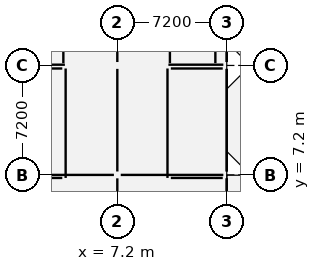
"""IFC4 building model, lengths in metres.
Left out: names, types, materials, properties, quantities, classifications, styles, units other than length and angle.
Written with IfcOpenShell. Run it as: python <this file> out.ifc"""

import sys

from ifc_helpers import new_model, si_unit, direction, frame, frame_2d, origin, origin_2d, place, context, subcontext, project, spatial, rectangle, extrude, element, fill, save


model = new_model("IFC4")
c1 = context("Model", 3, precision=1e-05, world=origin(), true_north=direction((0.0, 1.0)))
c2 = subcontext(c1, "Body", "Model", "MODEL_VIEW")
j1 = project(units=[si_unit("LENGTHUNIT", "METRE"), si_unit("PLANEANGLEUNIT", "RADIAN")], contexts=[c1])
p1 = place(None, origin())
s1 = spatial("IfcSite", under=j1, at=p1, CompositionType="ELEMENT")
p2 = place(p1, origin())
s2 = spatial("IfcBuilding", under=s1, at=p2, CompositionType="ELEMENT")
p3 = place(p2, frame((0.0, 0.0, 9.6)))
s3 = spatial("IfcBuildingStorey", under=s2, at=p3, CompositionType="ELEMENT", Elevation=9.6)
for number, where, z_axis, x_axis in (
    (1, (7.2, 7.2, 0.0), (0.0, 0.0, 1.0), (1.0, 0.0, 0.0)),
    (2, (7.2, 14.4, 0.0), (0.0, 0.0, 1.0), (1.0, 0.0, 0.0)),
    (3, (14.4, 7.2, 0.0), (0.0, 0.0, 1.0), (1.0, 0.0, 0.0)),
    (4, (14.4, 14.4, 0.0), (0.0, 0.0, 1.0), (1.0, 0.0, 0.0)),
):
    element("IfcColumn", number, at=place(p3, frame(where, z_axis=z_axis, x_axis=x_axis)), inside=s3, PredefinedType="COLUMN", context=c2, shape_type="SweptSolid", body=[
        extrude(rectangle(XDim=0.45, YDim=0.45, at=origin_2d()), origin(), (0.0, 0.0, 1.0), 3.9),
    ])
p4 = place(p3, frame((0.225, 14.45, 0.0), z_axis=(0.0, 0.0, 1.0), x_axis=(1.0, 0.0, 0.0)))
e5 = element("IfcWall", 5, at=p4, inside=s3, PredefinedType="SHEAR", context=c2, shape_type="SweptSolid", body=[
    extrude(rectangle(XDim=3.525, YDim=0.2, at=frame_2d((1.762, 0.0))), origin(), (0.0, 0.0, 1.0), 3.65),
])
p5 = place(p3, frame((3.65, 14.55, 0.0), z_axis=(0.0, 0.0, 1.0), x_axis=(0.0, 1.0, 0.0)))
e6 = element("IfcWall", 6, at=p5, inside=s3, PredefinedType="SHEAR", context=c2, shape_type="SweptSolid", body=[
    extrude(rectangle(XDim=6.56, YDim=0.2, at=frame_2d((3.28, 0.0))), origin(), (0.0, 0.0, 1.0), 3.65),
])
p6 = place(p5, frame((0.14, 0.0, 0.0)))
e7 = element("IfcOpeningElement", 7, at=p6, cuts=e6, PredefinedType="OPENING", context=c2, shape_type="SweptSolid", body=[
    extrude(rectangle(XDim=1.1, YDim=2.15, at=frame_2d((0.55, 1.075))), frame((0.0, 0.112, 0.0), z_axis=(0.0, -1.0, 0.0), x_axis=(1.0, 0.0, 0.0)), (0.0, 0.0, 1.0), 0.224),
])
p7 = place(p3, frame((10.56, 14.45, 0.0), z_axis=(0.0, 0.0, 1.0), x_axis=(1.0, 0.0, 0.0)))
e8 = element("IfcWall", 8, at=p7, inside=s3, PredefinedType="SHEAR", context=c2, shape_type="SweptSolid", body=[
    extrude(rectangle(XDim=3.615, YDim=0.2, at=frame_2d((1.808, 0.0))), origin(), (0.0, 0.0, 1.0), 3.65),
])
p8 = place(p3, frame((10.66, 14.55, 0.0), z_axis=(0.0, 0.0, 1.0), x_axis=(0.0, 1.0, 0.0)))
e9 = element("IfcWall", 9, at=p8, inside=s3, PredefinedType="SHEAR", context=c2, shape_type="SweptSolid", body=[
    extrude(rectangle(XDim=6.56, YDim=0.2, at=frame_2d((3.28, 0.0))), origin(), (0.0, 0.0, 1.0), 3.65),
])
p9 = place(p8, frame((0.14, 0.0, 0.0)))
e10 = element("IfcOpeningElement", 10, at=p9, cuts=e9, PredefinedType="OPENING", context=c2, shape_type="SweptSolid", body=[
    extrude(rectangle(XDim=1.1, YDim=2.15, at=frame_2d((0.55, 1.075))), frame((0.0, 0.112, 0.0), z_axis=(0.0, -1.0, 0.0), x_axis=(1.0, 0.0, 0.0)), (0.0, 0.0, 1.0), 0.224),
])
p10 = place(p3, frame((13.65, 14.55, 0.0), z_axis=(0.0, 0.0, 1.0), x_axis=(0.0, 1.0, 0.0)))
e11 = element("IfcWall", 11, at=p10, inside=s3, PredefinedType="SHEAR", context=c2, shape_type="SweptSolid", body=[
    extrude(rectangle(XDim=6.56, YDim=0.2, at=frame_2d((3.28, 0.0))), origin(), (0.0, 0.0, 1.0), 3.65),
])
p11 = place(p3, frame((14.4, 0.225, 0.0), z_axis=(0.0, 0.0, 1.0), x_axis=(0.0, 1.0, 0.0)))
e12 = element("IfcWall", 12, at=p11, inside=s3, PredefinedType="ELEMENTEDWALL", context=c2, shape_type="SweptSolid", body=[
    extrude(rectangle(XDim=6.75, YDim=0.28, at=frame_2d((3.375, 0.0))), origin(), (0.0, 0.0, 1.0), 2.99),
])
p12 = place(p11, frame((4.515, 0.0, 0.0)))
e13 = element("IfcOpeningElement", 13, at=p12, cuts=e12, PredefinedType="OPENING", context=c2, shape_type="SweptSolid", body=[
    extrude(rectangle(XDim=1.5, YDim=2.2, at=frame_2d((0.75, 1.1))), frame((0.0, 0.152, 0.0), z_axis=(0.0, -1.0, 0.0), x_axis=(1.0, 0.0, 0.0)), (0.0, 0.0, 1.0), 0.304),
])
p13 = place(p3, frame((14.4, 7.425, 0.0), z_axis=(0.0, 0.0, 1.0), x_axis=(0.0, 1.0, 0.0)))
e14 = element("IfcWall", 14, at=p13, inside=s3, PredefinedType="ELEMENTEDWALL", context=c2, shape_type="SweptSolid", body=[
    extrude(rectangle(XDim=6.75, YDim=0.28, at=frame_2d((3.375, 0.0))), origin(), (0.0, 0.0, 1.0), 3.04),
])
p14 = place(p13, frame((2.7, 0.0, 0.85)))
e15 = element("IfcOpeningElement", 15, at=p14, cuts=e14, PredefinedType="OPENING", context=c2, shape_type="SweptSolid", body=[
    extrude(rectangle(XDim=1.35, YDim=2.0, at=frame_2d((0.675, 1.0))), frame((0.0, 0.152, 0.0), z_axis=(0.0, -1.0, 0.0), x_axis=(1.0, 0.0, 0.0)), (0.0, 0.0, 1.0), 0.304),
])
p15 = place(p3, frame((14.4, 14.625, 0.0), z_axis=(0.0, 0.0, 1.0), x_axis=(0.0, 1.0, 0.0)))
e16 = element("IfcWall", 16, at=p15, inside=s3, PredefinedType="ELEMENTEDWALL", context=c2, shape_type="SweptSolid", body=[
    extrude(rectangle(XDim=6.75, YDim=0.28, at=frame_2d((3.375, 0.0))), origin(), (0.0, 0.0, 1.0), 2.99),
])
p16 = place(p15, frame((2.475, 0.0, 0.85)))
e17 = element("IfcOpeningElement", 17, at=p16, cuts=e16, PredefinedType="OPENING", context=c2, shape_type="SweptSolid", body=[
    extrude(rectangle(XDim=1.8, YDim=1.95, at=frame_2d((0.9, 0.975))), frame((0.0, 0.152, 0.0), z_axis=(0.0, -1.0, 0.0), x_axis=(1.0, 0.0, 0.0)), (0.0, 0.0, 1.0), 0.304),
])
p17 = place(p3, frame((10.5, 7.0, 0.0), z_axis=(0.0, 0.0, 1.0), x_axis=(0.0, 1.0, 0.0)))
e18 = element("IfcWall", 18, at=p17, inside=s3, PredefinedType="STANDARD", context=c2, shape_type="SweptSolid", body=[
    extrude(rectangle(XDim=7.2, YDim=0.15, at=frame_2d((3.6, 0.0))), origin(), (0.0, 0.0, 1.0), 2.938),
])
p18 = place(p17, frame((3.075, 0.0, 0.0)))
e19 = element("IfcOpeningElement", 19, at=p18, cuts=e18, PredefinedType="OPENING", context=c2, shape_type="SweptSolid", body=[
    extrude(rectangle(XDim=1.05, YDim=2.15, at=frame_2d((0.525, 1.075))), frame((0.0, 0.087, 0.0), z_axis=(0.0, -1.0, 0.0), x_axis=(1.0, 0.0, 0.0)), (0.0, 0.0, 1.0), 0.174),
])
p19 = place(p3, frame((10.72, 7.0, 0.0), z_axis=(0.0, 0.0, 1.0), x_axis=(1.0, 0.0, 0.0)))
e20 = element("IfcWall", 20, at=p19, inside=s3, PredefinedType="STANDARD", context=c2, shape_type="SweptSolid", body=[
    extrude(rectangle(XDim=3.415, YDim=0.15, at=frame_2d((1.708, 0.0))), origin(), (0.0, 0.0, 1.0), 2.938),
])
p20 = place(p3, frame((10.72, 14.2, 0.0), z_axis=(0.0, 0.0, 1.0), x_axis=(1.0, 0.0, 0.0)))
e21 = element("IfcWall", 21, at=p20, inside=s3, PredefinedType="STANDARD", context=c2, shape_type="SweptSolid", body=[
    extrude(rectangle(XDim=3.415, YDim=0.15, at=frame_2d((1.708, 0.0))), origin(), (0.0, 0.0, 1.0), 3.62),
])
p21 = place(p3, frame((3.8, 7.0, 0.0), z_axis=(0.0, 0.0, 1.0), x_axis=(0.0, 1.0, 0.0)))
e22 = element("IfcWall", 22, at=p21, inside=s3, PredefinedType="PLUMBINGWALL", context=c2, shape_type="SweptSolid", body=[
    extrude(rectangle(XDim=7.2, YDim=0.18, at=frame_2d((3.6, 0.0))), origin(), (0.0, 0.0, 1.0), 2.888),
])
p22 = place(p21, frame((3.15, 0.0, 0.0)))
e23 = element("IfcOpeningElement", 23, at=p22, cuts=e22, PredefinedType="OPENING", context=c2, shape_type="SweptSolid", body=[
    extrude(rectangle(XDim=0.9, YDim=2.1, at=frame_2d((0.45, 1.05))), frame((0.0, 0.102, 0.0), z_axis=(0.0, -1.0, 0.0), x_axis=(1.0, 0.0, 0.0)), (0.0, 0.0, 1.0), 0.204),
])
p23 = place(p3, frame((0.265, 7.0, 0.0), z_axis=(0.0, 0.0, 1.0), x_axis=(1.0, 0.0, 0.0)))
e24 = element("IfcWall", 24, at=p23, inside=s3, PredefinedType="PLUMBINGWALL", context=c2, shape_type="SweptSolid", body=[
    extrude(rectangle(XDim=3.315, YDim=0.18, at=frame_2d((1.658, 0.0))), origin(), (0.0, 0.0, 1.0), 2.888),
])
p24 = place(p3, frame((0.265, 14.2, 0.0), z_axis=(0.0, 0.0, 1.0), x_axis=(1.0, 0.0, 0.0)))
e25 = element("IfcWall", 25, at=p24, inside=s3, PredefinedType="PLUMBINGWALL", context=c2, shape_type="SweptSolid", body=[
    extrude(rectangle(XDim=3.315, YDim=0.18, at=frame_2d((1.658, 0.0))), origin(), (0.0, 0.0, 1.0), 3.62),
])
p25 = place(p12, frame((1.5, 0.0, 0.0), z_axis=(0.0, 0.0, 1.0), x_axis=(-1.0, 0.0, 0.0)))
e26 = element("IfcDoor", 26, at=p25, inside=s3, OperationType="DOUBLE_SWING_LEFT", PredefinedType="DOOR", context=c2, shape_type="SweptSolid", body=[
    extrude(rectangle(XDim=1.5, YDim=2.2, at=frame_2d((0.75, 1.1))), frame((0.0, 0.025, 0.0), z_axis=(0.0, -1.0, 0.0), x_axis=(1.0, 0.0, 0.0)), (0.0, 0.0, 1.0), 0.05),
])
fill(e13, e26)
p26 = place(p14, origin())
e27 = element("IfcWindow", 27, at=p26, inside=s3, PartitioningType="SINGLE_PANEL", PredefinedType="WINDOW", context=c2, shape_type="SweptSolid", body=[
    extrude(rectangle(XDim=1.35, YDim=2.0, at=frame_2d((0.675, 1.0))), frame((0.0, 0.03, 0.0), z_axis=(0.0, -1.0, 0.0), x_axis=(1.0, 0.0, 0.0)), (0.0, 0.0, 1.0), 0.06),
])
fill(e15, e27)
p27 = place(p6, origin())
e28 = element("IfcDoor", 28, at=p27, inside=s3, OperationType="SINGLE_SWING_LEFT", PredefinedType="DOOR", context=c2, shape_type="SweptSolid", body=[
    extrude(rectangle(XDim=1.1, YDim=2.15, at=frame_2d((0.55, 1.075))), frame((0.0, 0.025, 0.0), z_axis=(0.0, -1.0, 0.0), x_axis=(1.0, 0.0, 0.0)), (0.0, 0.0, 1.0), 0.05),
])
fill(e7, e28)
p28 = place(p9, frame((1.1, 0.0, 0.0), z_axis=(0.0, 0.0, 1.0), x_axis=(-1.0, 0.0, 0.0)))
e29 = element("IfcDoor", 29, at=p28, inside=s3, OperationType="SINGLE_SWING_RIGHT", PredefinedType="DOOR", context=c2, shape_type="SweptSolid", body=[
    extrude(rectangle(XDim=1.1, YDim=2.15, at=frame_2d((0.55, 1.075))), frame((0.0, 0.025, 0.0), z_axis=(0.0, -1.0, 0.0), x_axis=(1.0, 0.0, 0.0)), (0.0, 0.0, 1.0), 0.05),
])
fill(e10, e29)
p29 = place(p18, origin())
e30 = element("IfcDoor", 30, at=p29, inside=s3, OperationType="SINGLE_SWING_LEFT", PredefinedType="DOOR", context=c2, shape_type="SweptSolid", body=[
    extrude(rectangle(XDim=1.05, YDim=2.15, at=frame_2d((0.525, 1.075))), frame((0.0, 0.025, 0.0), z_axis=(0.0, -1.0, 0.0), x_axis=(1.0, 0.0, 0.0)), (0.0, 0.0, 1.0), 0.05),
])
fill(e19, e30)
p30 = place(p22, origin())
e31 = element("IfcDoor", 31, at=p30, inside=s3, OperationType="SINGLE_SWING_RIGHT", PredefinedType="DOOR", context=c2, shape_type="SweptSolid", body=[
    extrude(rectangle(XDim=0.9, YDim=2.1, at=frame_2d((0.45, 1.05))), frame((0.0, 0.025, 0.0), z_axis=(0.0, -1.0, 0.0), x_axis=(1.0, 0.0, 0.0)), (0.0, 0.0, 1.0), 0.05),
])
fill(e23, e31)
save(model, sys.argv[1])
